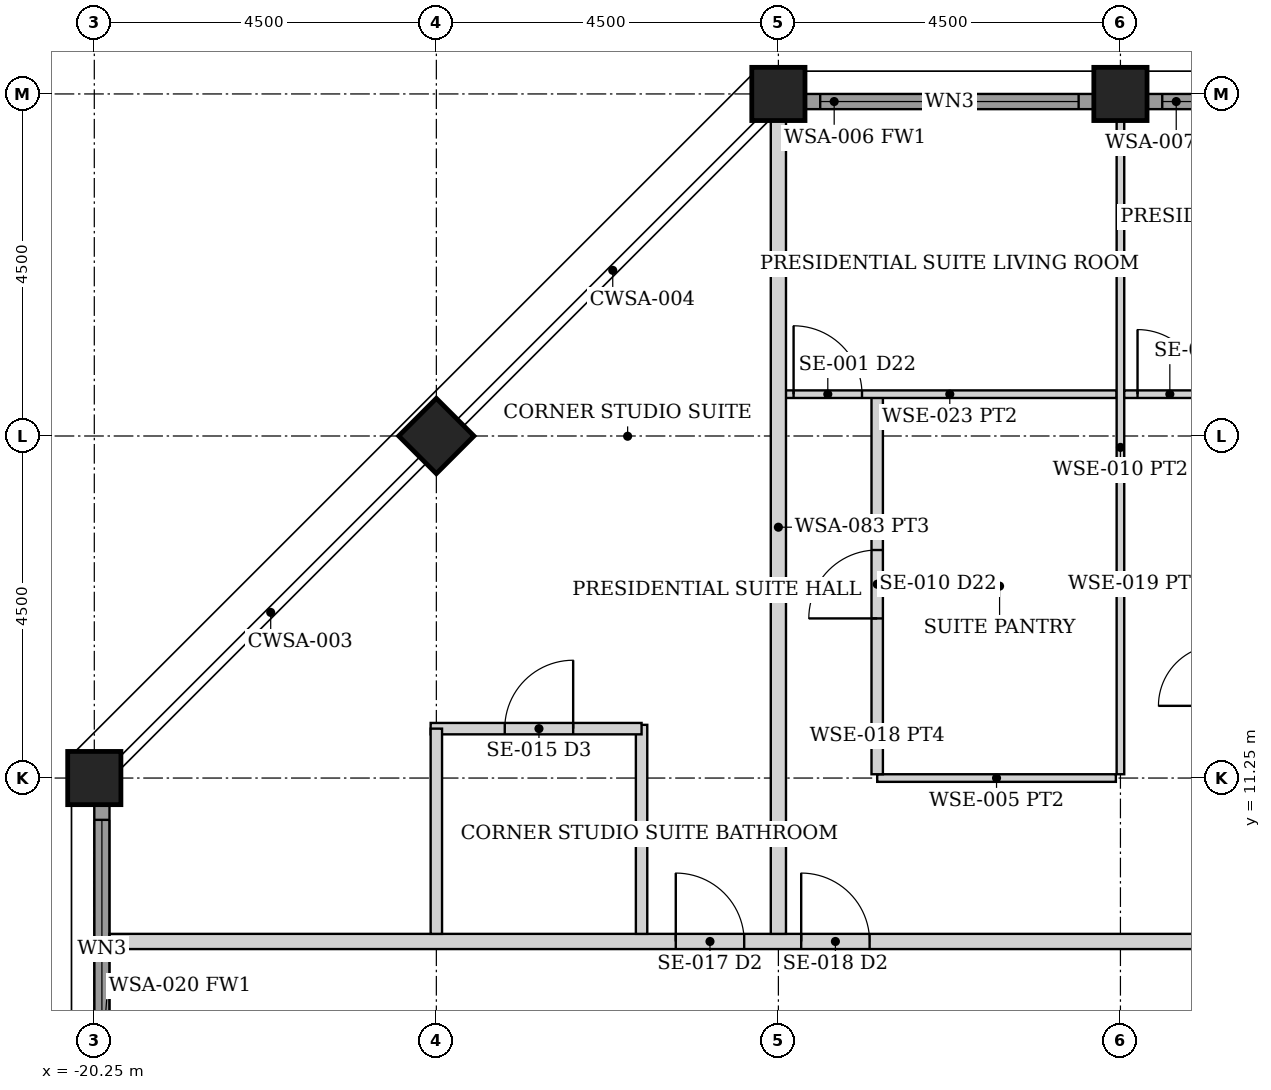
"""IFC4 building model, lengths in metres.
Left out: names, types, materials, properties, quantities, classifications, styles, units other than length and angle.
Written with IfcOpenShell. Run it as: python <this file> out.ifc"""

import sys

from ifc_helpers import new_model, si_unit, direction, frame, frame_2d, origin, origin_2d, place, context, subcontext, project, spatial, rectangle, hollow_rectangle, extrude, element, fill, save


model = new_model("IFC4")
c1 = context("Model", 3, precision=1e-05, world=origin(), true_north=direction((0.0, 1.0)))
c2 = subcontext(c1, "Body", "Model", "MODEL_VIEW")
j1 = project(units=[si_unit("LENGTHUNIT", "METRE"), si_unit("PLANEANGLEUNIT", "RADIAN")], contexts=[c1])
p1 = place(None, origin())
s1 = spatial("IfcSite", under=j1, at=p1, CompositionType="ELEMENT")
p2 = place(p1, origin())
s2 = spatial("IfcBuilding", under=s1, at=p2, CompositionType="ELEMENT")
p3 = place(p2, frame((0.0, 0.0, 245.8)))
s3 = spatial("IfcBuildingStorey", under=s2, at=p3, CompositionType="ELEMENT", Elevation=245.8)
for number, where, z_axis, x_axis in (
    (1, (-11.25, 20.25, 0.0), (0.0, 0.0, 1.0), (0.0, 1.0, 0.0)),
    (2, (-6.75, 20.25, 0.0), (0.0, 0.0, 1.0), (0.0, 1.0, 0.0)),
    (3, (-20.25, 11.25, 0.0), (0.0, 0.0, 1.0), (1.0, 0.0, 0.0)),
    (4, (-15.75, 15.75, 0.0), (0.0, 0.0, 1.0), (0.707, -0.707, 0.0)),
):
    element("IfcColumn", number, at=place(p3, frame(where, z_axis=z_axis, x_axis=x_axis)), inside=s3, PredefinedType="COLUMN", context=c2, shape_type="SweptSolid", body=[
        extrude(hollow_rectangle(XDim=0.7, YDim=0.7, WallThickness=0.035, at=origin_2d()), origin(), (0.0, 0.0, 1.0), 3.75),
    ])
p4 = place(p3, frame((-10.895, 20.15, 0.0), z_axis=(0.0, 0.0, 1.0), x_axis=(1.0, 0.0, 0.0)))
e5 = element("IfcWall", 5, at=p4, inside=s3, PredefinedType="SOLIDWALL", context=c2, shape_type="SweptSolid", body=[
    extrude(rectangle(XDim=3.79, YDim=0.2, at=frame_2d((1.895, 0.0))), origin(), (0.0, 0.0, 1.0), 2.629),
])
p5 = place(p4, frame((0.195, 0.0, 0.3)))
e6 = element("IfcOpeningElement", 6, at=p5, cuts=e5, PredefinedType="OPENING", context=c2, shape_type="SweptSolid", body=[
    extrude(rectangle(XDim=3.4, YDim=2.179, at=frame_2d((1.7, 1.089))), frame((0.0, 0.11, 0.0), z_axis=(0.0, -1.0, 0.0), x_axis=(1.0, 0.0, 0.0)), (0.0, 0.0, 1.0), 0.22),
])
p6 = place(p3, frame((-6.395, 20.15, 0.0), z_axis=(0.0, 0.0, 1.0), x_axis=(1.0, 0.0, 0.0)))
e7 = element("IfcWall", 7, at=p6, inside=s3, PredefinedType="SOLIDWALL", context=c2, shape_type="SweptSolid", body=[
    extrude(rectangle(XDim=3.79, YDim=0.2, at=frame_2d((1.895, 0.0))), origin(), (0.0, 0.0, 1.0), 2.629),
])
p7 = place(p6, frame((0.195, 0.0, 0.3)))
e8 = element("IfcOpeningElement", 8, at=p7, cuts=e7, PredefinedType="OPENING", context=c2, shape_type="SweptSolid", body=[
    extrude(rectangle(XDim=3.4, YDim=2.179, at=frame_2d((1.7, 1.089))), frame((0.0, 0.11, 0.0), z_axis=(0.0, -1.0, 0.0), x_axis=(1.0, 0.0, 0.0)), (0.0, 0.0, 1.0), 0.22),
])
p8 = place(p3, frame((-20.15, 7.105, 0.0), z_axis=(0.0, 0.0, 1.0), x_axis=(0.0, 1.0, 0.0)))
e9 = element("IfcWall", 9, at=p8, inside=s3, PredefinedType="SOLIDWALL", context=c2, shape_type="SweptSolid", body=[
    extrude(rectangle(XDim=3.79, YDim=0.2, at=frame_2d((1.895, 0.0))), origin(), (0.0, 0.0, 1.0), 2.629),
])
p9 = place(p8, frame((0.195, 0.0, 0.3)))
e10 = element("IfcOpeningElement", 10, at=p9, cuts=e9, PredefinedType="OPENING", context=c2, shape_type="SweptSolid", body=[
    extrude(rectangle(XDim=3.4, YDim=2.179, at=frame_2d((1.7, 1.089))), frame((0.0, 0.11, 0.0), z_axis=(0.0, -1.0, 0.0), x_axis=(1.0, 0.0, 0.0)), (0.0, 0.0, 1.0), 0.22),
])
p10 = place(p3, frame((-20.05, 9.1, 0.0), z_axis=(0.0, 0.0, 1.0), x_axis=(1.0, 0.0, 0.0)))
e11 = element("IfcWall", 11, at=p10, inside=s3, PredefinedType="PARTITIONING", context=c2, shape_type="SweptSolid", body=[
    extrude(rectangle(XDim=40.1, YDim=0.2, at=frame_2d((20.05, 0.0))), origin(), (0.0, 0.0, 1.0), 2.629),
])
p11 = place(p10, frame((9.1, 0.0, 0.0)))
e12 = element("IfcOpeningElement", 12, at=p11, cuts=e11, PredefinedType="OPENING", context=c2, shape_type="SweptSolid", body=[
    extrude(rectangle(XDim=0.9, YDim=2.1, at=frame_2d((0.45, 1.05))), frame((0.0, 0.11, 0.0), z_axis=(0.0, -1.0, 0.0), x_axis=(1.0, 0.0, 0.0)), (0.0, 0.0, 1.0), 0.22),
])
p12 = place(p10, frame((31.75, 0.0, 0.0)))
e13 = element("IfcOpeningElement", 13, at=p12, cuts=e11, PredefinedType="OPENING", context=c2, shape_type="SweptSolid", body=[
    extrude(rectangle(XDim=0.9, YDim=2.1, at=frame_2d((0.45, 1.05))), frame((0.0, 0.11, 0.0), z_axis=(0.0, -1.0, 0.0), x_axis=(1.0, 0.0, 0.0)), (0.0, 0.0, 1.0), 0.22),
])
p13 = place(p10, frame((7.45, 0.0, 0.0)))
e14 = element("IfcOpeningElement", 14, at=p13, cuts=e11, PredefinedType="OPENING", context=c2, shape_type="SweptSolid", body=[
    extrude(rectangle(XDim=0.9, YDim=2.1, at=frame_2d((0.45, 1.05))), frame((0.0, 0.11, 0.0), z_axis=(0.0, -1.0, 0.0), x_axis=(1.0, 0.0, 0.0)), (0.0, 0.0, 1.0), 0.22),
])
p14 = place(p3, frame((-9.95, 11.25, 0.0), z_axis=(0.0, 0.0, 1.0), x_axis=(1.0, 0.0, 0.0)))
e15 = element("IfcWall", 15, at=p14, inside=s3, PredefinedType="PARTITIONING", context=c2, shape_type="SweptSolid", body=[
    extrude(rectangle(XDim=3.14, YDim=0.1, at=frame_2d((1.57, 0.0))), origin(), (0.0, 0.0, 1.0), 2.629),
])
p15 = place(p3, frame((-9.95, 11.3, 0.0), z_axis=(0.0, 0.0, 1.0), x_axis=(0.0, 1.0, 0.0)))
e16 = element("IfcWall", 16, at=p15, inside=s3, PredefinedType="PARTITIONING", context=c2, shape_type="SweptSolid", body=[
    extrude(rectangle(XDim=5.0, YDim=0.15, at=frame_2d((2.5, 0.0))), origin(), (0.0, 0.0, 1.0), 2.629),
])
p16 = place(p15, frame((2.05, 0.0, 0.0)))
e17 = element("IfcOpeningElement", 17, at=p16, cuts=e16, PredefinedType="OPENING", context=c2, shape_type="SweptSolid", body=[
    extrude(rectangle(XDim=0.9, YDim=2.1, at=frame_2d((0.45, 1.05))), frame((0.0, 0.085, 0.0), z_axis=(0.0, -1.0, 0.0), x_axis=(1.0, 0.0, 0.0)), (0.0, 0.0, 1.0), 0.17),
])
p17 = place(p3, frame((-11.19, 16.3, 0.0), z_axis=(0.0, 0.0, 1.0), x_axis=(1.0, 0.0, 0.0)))
e18 = element("IfcWall", 18, at=p17, inside=s3, PredefinedType="PARTITIONING", context=c2, shape_type="SweptSolid", body=[
    extrude(rectangle(XDim=4.39, YDim=0.1, at=frame_2d((2.195, 0.0))), origin(), (0.0, 0.0, 1.0), 2.629),
])
p18 = place(p17, frame((0.14, 0.0, 0.0)))
e19 = element("IfcOpeningElement", 19, at=p18, cuts=e18, PredefinedType="OPENING", context=c2, shape_type="SweptSolid", body=[
    extrude(rectangle(XDim=0.9, YDim=2.1, at=frame_2d((0.45, 1.05))), frame((0.0, 0.06, 0.0), z_axis=(0.0, -1.0, 0.0), x_axis=(1.0, 0.0, 0.0)), (0.0, 0.0, 1.0), 0.12),
])
p19 = place(p3, frame((-6.75, 11.3, 0.0), z_axis=(0.0, 0.0, 1.0), x_axis=(0.0, 1.0, 0.0)))
e20 = element("IfcWall", 20, at=p19, inside=s3, PredefinedType="PARTITIONING", context=c2, shape_type="SweptSolid", body=[
    extrude(rectangle(XDim=8.6, YDim=0.1, at=frame_2d((4.3, 0.0))), origin(), (0.0, 0.0, 1.0), 2.629),
])
p20 = place(p3, frame((-6.7, 16.3, 0.0), z_axis=(0.0, 0.0, 1.0), x_axis=(1.0, 0.0, 0.0)))
e21 = element("IfcWall", 21, at=p20, inside=s3, PredefinedType="PARTITIONING", context=c2, shape_type="SweptSolid", body=[
    extrude(rectangle(XDim=4.4, YDim=0.1, at=frame_2d((2.2, 0.0))), origin(), (0.0, 0.0, 1.0), 2.629),
])
p21 = place(p20, frame((0.175, 0.0, 0.0)))
e22 = element("IfcOpeningElement", 22, at=p21, cuts=e21, PredefinedType="OPENING", context=c2, shape_type="SweptSolid", body=[
    extrude(rectangle(XDim=0.85, YDim=2.1, at=frame_2d((0.425, 1.05))), frame((0.0, 0.06, 0.0), z_axis=(0.0, -1.0, 0.0), x_axis=(1.0, 0.0, 0.0)), (0.0, 0.0, 1.0), 0.12),
])
p22 = place(p20, frame((2.41, 0.0, 0.0)))
e23 = element("IfcOpeningElement", 23, at=p22, cuts=e21, PredefinedType="OPENING", context=c2, shape_type="SweptSolid", body=[
    extrude(rectangle(XDim=0.9, YDim=2.1, at=frame_2d((0.45, 1.05))), frame((0.0, 0.06, 0.0), z_axis=(0.0, -1.0, 0.0), x_axis=(1.0, 0.0, 0.0)), (0.0, 0.0, 1.0), 0.12),
])
p23 = place(p3, frame((-11.25, 9.2, 0.0), z_axis=(0.0, 0.0, 1.0), x_axis=(0.0, 1.0, 0.0)))
e24 = element("IfcWall", 24, at=p23, inside=s3, PredefinedType="PARTITIONING", context=c2, shape_type="SweptSolid", body=[
    extrude(rectangle(XDim=10.7, YDim=0.2, at=frame_2d((5.35, 0.0))), origin(), (0.0, 0.0, 1.0), 2.629),
])
p24 = place(p3, frame((-13.05, 9.2, 0.0), z_axis=(0.0, 0.0, 1.0), x_axis=(0.0, 1.0, 0.0)))
e25 = element("IfcWall", 25, at=p24, inside=s3, PredefinedType="PARTITIONING", context=c2, shape_type="SweptSolid", body=[
    extrude(rectangle(XDim=2.75, YDim=0.15, at=frame_2d((1.375, 0.0))), origin(), (0.0, 0.0, 1.0), 2.629),
])
p25 = place(p3, frame((-15.825, 11.9, 0.0), z_axis=(0.0, 0.0, 1.0), x_axis=(1.0, 0.0, 0.0)))
e26 = element("IfcWall", 26, at=p25, inside=s3, PredefinedType="PARTITIONING", context=c2, shape_type="SweptSolid", body=[
    extrude(rectangle(XDim=2.775, YDim=0.15, at=frame_2d((1.387, 0.0))), origin(), (0.0, 0.0, 1.0), 2.629),
])
p26 = place(p25, frame((0.975, 0.0, 0.0)))
e27 = element("IfcOpeningElement", 27, at=p26, cuts=e26, PredefinedType="OPENING", context=c2, shape_type="SweptSolid", body=[
    extrude(rectangle(XDim=0.9, YDim=2.1, at=frame_2d((0.45, 1.05))), frame((0.0, 0.085, 0.0), z_axis=(0.0, -1.0, 0.0), x_axis=(1.0, 0.0, 0.0)), (0.0, 0.0, 1.0), 0.17),
])
p27 = place(p3, frame((-15.75, 9.2, 0.0), z_axis=(0.0, 0.0, 1.0), x_axis=(0.0, 1.0, 0.0)))
e28 = element("IfcWall", 28, at=p27, inside=s3, PredefinedType="PARTITIONING", context=c2, shape_type="SweptSolid", body=[
    extrude(rectangle(XDim=2.7, YDim=0.15, at=frame_2d((1.35, 0.0))), origin(), (0.0, 0.0, 1.0), 2.629),
])
p28 = place(p5, origin())
e29 = element("IfcWindow", 29, at=p28, inside=s3, PartitioningType="SINGLE_PANEL", PredefinedType="WINDOW", context=c2, shape_type="SweptSolid", body=[
    extrude(rectangle(XDim=3.4, YDim=2.179, at=frame_2d((1.7, 1.089))), frame((0.0, 0.03, 0.0), z_axis=(0.0, -1.0, 0.0), x_axis=(1.0, 0.0, 0.0)), (0.0, 0.0, 1.0), 0.06),
])
fill(e6, e29)
p29 = place(p7, origin())
e30 = element("IfcWindow", 30, at=p29, inside=s3, PartitioningType="SINGLE_PANEL", PredefinedType="WINDOW", context=c2, shape_type="SweptSolid", body=[
    extrude(rectangle(XDim=3.4, YDim=2.179, at=frame_2d((1.7, 1.089))), frame((0.0, 0.03, 0.0), z_axis=(0.0, -1.0, 0.0), x_axis=(1.0, 0.0, 0.0)), (0.0, 0.0, 1.0), 0.06),
])
fill(e8, e30)
p30 = place(p9, origin())
e31 = element("IfcWindow", 31, at=p30, inside=s3, PartitioningType="SINGLE_PANEL", PredefinedType="WINDOW", context=c2, shape_type="SweptSolid", body=[
    extrude(rectangle(XDim=3.4, YDim=2.179, at=frame_2d((1.7, 1.089))), frame((0.0, 0.03, 0.0), z_axis=(0.0, -1.0, 0.0), x_axis=(1.0, 0.0, 0.0)), (0.0, 0.0, 1.0), 0.06),
])
fill(e10, e31)
p31 = place(p11, origin())
e32 = element("IfcDoor", 32, at=p31, inside=s3, OperationType="SINGLE_SWING_LEFT", PredefinedType="DOOR", context=c2, shape_type="SweptSolid", body=[
    extrude(rectangle(XDim=0.9, YDim=2.1, at=frame_2d((0.45, 1.05))), frame((0.0, 0.025, 0.0), z_axis=(0.0, -1.0, 0.0), x_axis=(1.0, 0.0, 0.0)), (0.0, 0.0, 1.0), 0.05),
])
fill(e12, e32)
p32 = place(p16, origin())
e33 = element("IfcDoor", 33, at=p32, inside=s3, OperationType="SINGLE_SWING_LEFT", PredefinedType="DOOR", context=c2, shape_type="SweptSolid", body=[
    extrude(rectangle(XDim=0.9, YDim=2.1, at=frame_2d((0.45, 1.05))), frame((0.0, 0.025, 0.0), z_axis=(0.0, -1.0, 0.0), x_axis=(1.0, 0.0, 0.0)), (0.0, 0.0, 1.0), 0.05),
])
fill(e17, e33)
p33 = place(p18, origin())
e34 = element("IfcDoor", 34, at=p33, inside=s3, OperationType="SINGLE_SWING_LEFT", PredefinedType="DOOR", context=c2, shape_type="SweptSolid", body=[
    extrude(rectangle(XDim=0.9, YDim=2.1, at=frame_2d((0.45, 1.05))), frame((0.0, 0.025, 0.0), z_axis=(0.0, -1.0, 0.0), x_axis=(1.0, 0.0, 0.0)), (0.0, 0.0, 1.0), 0.05),
])
fill(e19, e34)
p34 = place(p21, origin())
e35 = element("IfcDoor", 35, at=p34, inside=s3, OperationType="SINGLE_SWING_LEFT", PredefinedType="DOOR", context=c2, shape_type="SweptSolid", body=[
    extrude(rectangle(XDim=0.85, YDim=2.1, at=frame_2d((0.425, 1.05))), frame((0.0, 0.025, 0.0), z_axis=(0.0, -1.0, 0.0), x_axis=(1.0, 0.0, 0.0)), (0.0, 0.0, 1.0), 0.05),
])
fill(e22, e35)
p35 = place(p13, origin())
e36 = element("IfcDoor", 36, at=p35, inside=s3, OperationType="SINGLE_SWING_LEFT", PredefinedType="DOOR", context=c2, shape_type="SweptSolid", body=[
    extrude(rectangle(XDim=0.9, YDim=2.1, at=frame_2d((0.45, 1.05))), frame((0.0, 0.025, 0.0), z_axis=(0.0, -1.0, 0.0), x_axis=(1.0, 0.0, 0.0)), (0.0, 0.0, 1.0), 0.05),
])
fill(e14, e36)
p36 = place(p26, origin())
e37 = element("IfcDoor", 37, at=p36, inside=s3, OperationType="SINGLE_SWING_RIGHT", PredefinedType="DOOR", context=c2, shape_type="SweptSolid", body=[
    extrude(rectangle(XDim=0.9, YDim=2.1, at=frame_2d((0.45, 1.05))), frame((0.0, 0.025, 0.0), z_axis=(0.0, -1.0, 0.0), x_axis=(1.0, 0.0, 0.0)), (0.0, 0.0, 1.0), 0.05),
])
fill(e27, e37)
save(model, sys.argv[1])
